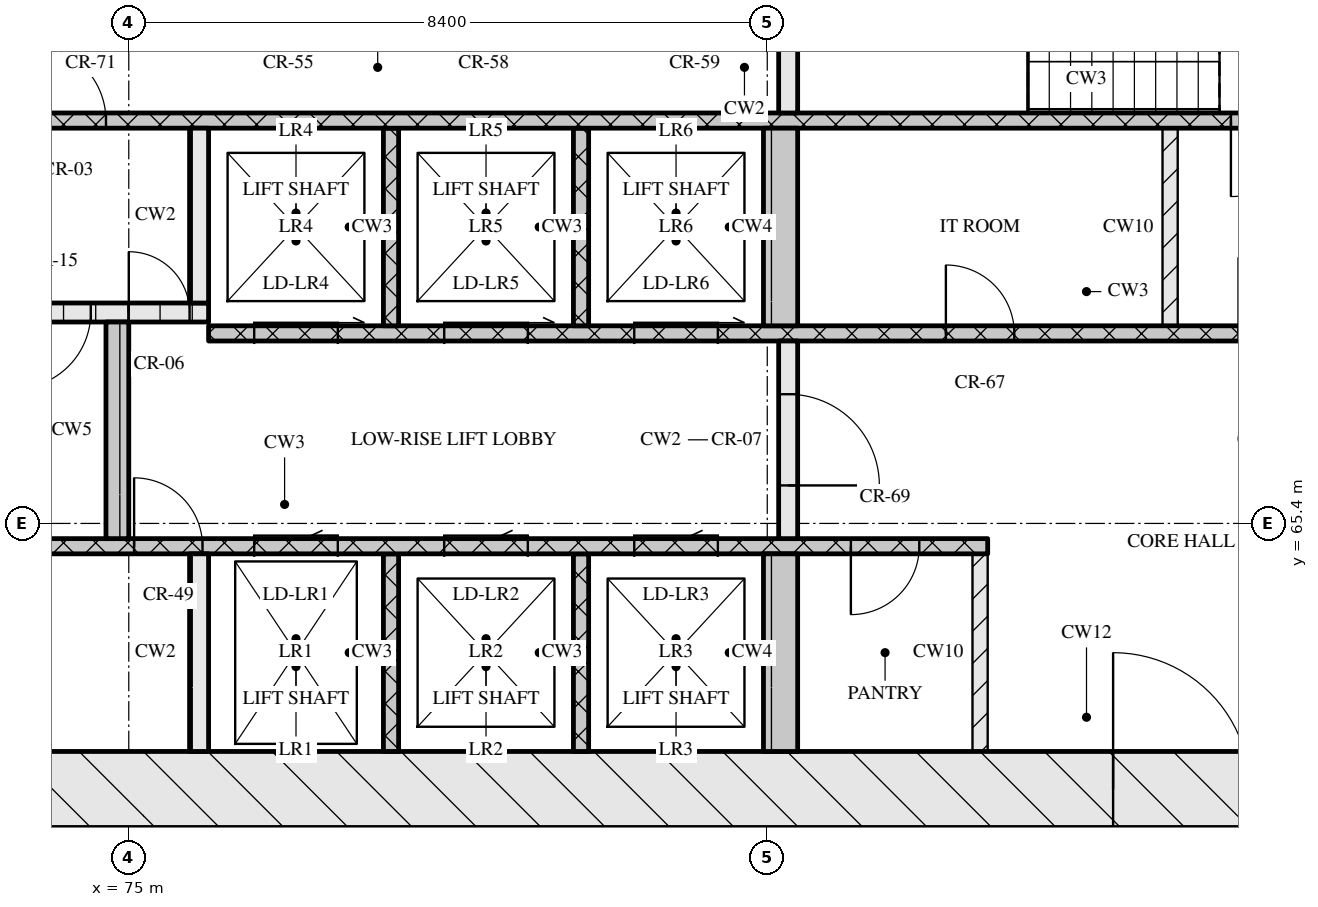
"""IFC4 building model, lengths in metres.
Left out: names, types, materials, properties, quantities, classifications, styles, units other than length and angle.
Written with IfcOpenShell. Run it as: python <this file> out.ifc"""

import sys

from ifc_helpers import new_model, si_unit, direction, frame, frame_2d, origin, place, context, subcontext, project, spatial, rectangle, extrude, element, fill, save


model = new_model("IFC4")
c1 = context("Model", 3, precision=1e-05, world=origin(), true_north=direction((0.0, 1.0)))
c2 = subcontext(c1, "Body", "Model", "MODEL_VIEW")
j1 = project(units=[si_unit("LENGTHUNIT", "METRE"), si_unit("PLANEANGLEUNIT", "RADIAN")], contexts=[c1])
p1 = place(None, origin())
s1 = spatial("IfcSite", under=j1, at=p1, CompositionType="ELEMENT")
p2 = place(p1, origin())
s2 = spatial("IfcBuilding", under=s1, at=p2, CompositionType="ELEMENT")
p3 = place(p2, frame((0.0, 0.0, 138.45)))
s3 = spatial("IfcBuildingStorey", under=s2, at=p3, CompositionType="ELEMENT", Elevation=138.45)
p4 = place(p3, frame((66.8, 61.9, 0.0), z_axis=(0.0, 0.0, 1.0), x_axis=(1.0, 0.0, 0.0)))
e1 = element("IfcWall", 1, at=p4, inside=s3, PredefinedType="SOLIDWALL", context=c2, shape_type="SweptSolid", body=[
    extrude(rectangle(XDim=41.6, YDim=1.0, at=frame_2d((20.8, 0.0))), origin(), (0.0, 0.0, 1.0), 3.3),
])
p5 = place(p4, frame((21.15, 0.0, 0.0)))
e2 = element("IfcOpeningElement", 2, at=p5, cuts=e1, PredefinedType="OPENING", context=c2, shape_type="SweptSolid", body=[
    extrude(rectangle(XDim=1.8, YDim=2.1, at=frame_2d((0.9, 1.05))), frame((0.0, 0.51, 0.0), z_axis=(0.0, -1.0, 0.0), x_axis=(1.0, 0.0, 0.0)), (0.0, 0.0, 1.0), 1.02),
])
p6 = place(p3, frame((75.925, 62.4, 0.0), z_axis=(0.0, 0.0, 1.0), x_axis=(0.0, 1.0, 0.0)))
e3 = element("IfcWall", 3, at=p6, inside=s3, PredefinedType="SOLIDWALL", context=c2, shape_type="SweptSolid", body=[
    extrude(rectangle(XDim=2.6, YDim=0.25, at=frame_2d((1.3, 0.0))), origin(), (0.0, 0.0, 1.0), 3.3),
])
for number, where, z_axis, x_axis in (
    (4, (78.45, 62.4, 0.0), (0.0, 0.0, 1.0), (0.0, 1.0, 0.0)),
    (5, (80.95, 62.4, 0.0), (0.0, 0.0, 1.0), (0.0, 1.0, 0.0)),
):
    element("IfcWall", number, at=place(p3, frame(where, z_axis=z_axis, x_axis=x_axis)), inside=s3, PredefinedType="SOLIDWALL", context=c2, shape_type="SweptSolid", body=[
        extrude(rectangle(XDim=2.6, YDim=0.2, at=frame_2d((1.3, 0.0))), origin(), (0.0, 0.0, 1.0), 3.3),
    ])
p7 = place(p3, frame((83.575, 62.4, 0.0), z_axis=(0.0, 0.0, 1.0), x_axis=(0.0, 1.0, 0.0)))
e6 = element("IfcWall", 6, at=p7, inside=s3, PredefinedType="SOLIDWALL", context=c2, shape_type="SweptSolid", body=[
    extrude(rectangle(XDim=2.6, YDim=0.45, at=frame_2d((1.3, 0.0))), origin(), (0.0, 0.0, 1.0), 3.3),
])
p8 = place(p3, frame((86.2, 62.4, 0.0), z_axis=(0.0, 0.0, 1.0), x_axis=(0.0, 1.0, 0.0)))
e7 = element("IfcWall", 7, at=p8, inside=s3, PredefinedType="PARTITIONING", context=c2, shape_type="SweptSolid", body=[
    extrude(rectangle(XDim=2.6, YDim=0.2, at=frame_2d((1.3, 0.0))), origin(), (0.0, 0.0, 1.0), 3.3),
])
p9 = place(p3, frame((67.8, 65.1, 0.0), z_axis=(0.0, 0.0, 1.0), x_axis=(1.0, 0.0, 0.0)))
e8 = element("IfcWall", 8, at=p9, inside=s3, PredefinedType="SOLIDWALL", context=c2, shape_type="SweptSolid", body=[
    extrude(rectangle(XDim=18.5, YDim=0.2, at=frame_2d((9.25, 0.0))), origin(), (0.0, 0.0, 1.0), 3.3),
])
p10 = place(p9, frame((7.27, 0.0, 0.0)))
e9 = element("IfcOpeningElement", 9, at=p10, cuts=e8, PredefinedType="OPENING", context=c2, shape_type="SweptSolid", body=[
    extrude(rectangle(XDim=0.9, YDim=2.1, at=frame_2d((0.45, 1.05))), frame((0.0, 0.11, 0.0), z_axis=(0.0, -1.0, 0.0), x_axis=(1.0, 0.0, 0.0)), (0.0, 0.0, 1.0), 0.22),
])
p11 = place(p9, frame((8.85, 0.0, 0.0)))
e10 = element("IfcOpeningElement", 10, at=p11, cuts=e8, PredefinedType="OPENING", context=c2, shape_type="SweptSolid", body=[
    extrude(rectangle(XDim=1.1, YDim=2.1, at=frame_2d((0.55, 1.05))), frame((0.0, 0.11, 0.0), z_axis=(0.0, -1.0, 0.0), x_axis=(1.0, 0.0, 0.0)), (0.0, 0.0, 1.0), 0.22),
])
p12 = place(p9, frame((11.35, 0.0, 0.0)))
e11 = element("IfcOpeningElement", 11, at=p12, cuts=e8, PredefinedType="OPENING", context=c2, shape_type="SweptSolid", body=[
    extrude(rectangle(XDim=1.1, YDim=2.1, at=frame_2d((0.55, 1.05))), frame((0.0, 0.11, 0.0), z_axis=(0.0, -1.0, 0.0), x_axis=(1.0, 0.0, 0.0)), (0.0, 0.0, 1.0), 0.22),
])
p13 = place(p9, frame((13.85, 0.0, 0.0)))
e12 = element("IfcOpeningElement", 12, at=p13, cuts=e8, PredefinedType="OPENING", context=c2, shape_type="SweptSolid", body=[
    extrude(rectangle(XDim=1.1, YDim=2.1, at=frame_2d((0.55, 1.05))), frame((0.0, 0.11, 0.0), z_axis=(0.0, -1.0, 0.0), x_axis=(1.0, 0.0, 0.0)), (0.0, 0.0, 1.0), 0.22),
])
p14 = place(p9, frame((16.7, 0.0, 0.0)))
e13 = element("IfcOpeningElement", 13, at=p14, cuts=e8, PredefinedType="OPENING", context=c2, shape_type="SweptSolid", body=[
    extrude(rectangle(XDim=0.9, YDim=2.1, at=frame_2d((0.45, 1.05))), frame((0.0, 0.11, 0.0), z_axis=(0.0, -1.0, 0.0), x_axis=(1.0, 0.0, 0.0)), (0.0, 0.0, 1.0), 0.22),
])
p15 = place(p3, frame((74.85, 65.2, 0.0), z_axis=(0.0, 0.0, 1.0), x_axis=(0.0, 1.0, 0.0)))
e14 = element("IfcWall", 14, at=p15, inside=s3, PredefinedType="SOLIDWALL", context=c2, shape_type="SweptSolid", body=[
    extrude(rectangle(XDim=2.85, YDim=0.3, at=frame_2d((1.425, 0.0))), origin(), (0.0, 0.0, 1.0), 3.3),
])
p16 = place(p3, frame((83.675, 65.2, 0.0), z_axis=(0.0, 0.0, 1.0), x_axis=(0.0, 1.0, 0.0)))
e15 = element("IfcWall", 15, at=p16, inside=s3, PredefinedType="SOLIDWALL", context=c2, shape_type="SweptSolid", body=[
    extrude(rectangle(XDim=2.6, YDim=0.25, at=frame_2d((1.3, 0.0))), origin(), (0.0, 0.0, 1.0), 3.3),
])
p17 = place(p16, frame((0.7, 0.0, 0.0)))
e16 = element("IfcOpeningElement", 16, at=p17, cuts=e15, PredefinedType="OPENING", context=c2, shape_type="SweptSolid", body=[
    extrude(rectangle(XDim=1.2, YDim=2.1, at=frame_2d((0.6, 1.05))), frame((0.0, 0.135, 0.0), z_axis=(0.0, -1.0, 0.0), x_axis=(1.0, 0.0, 0.0)), (0.0, 0.0, 1.0), 0.27),
])
p18 = place(p3, frame((76.05, 67.9, 0.0), z_axis=(0.0, 0.0, 1.0), x_axis=(1.0, 0.0, 0.0)))
e17 = element("IfcWall", 17, at=p18, inside=s3, PredefinedType="SOLIDWALL", context=c2, shape_type="SweptSolid", body=[
    extrude(rectangle(XDim=23.1, YDim=0.2, at=frame_2d((11.55, 0.0))), origin(), (0.0, 0.0, 1.0), 3.3),
])
p19 = place(p18, frame((0.6, 0.0, 0.0)))
e18 = element("IfcOpeningElement", 18, at=p19, cuts=e17, PredefinedType="OPENING", context=c2, shape_type="SweptSolid", body=[
    extrude(rectangle(XDim=1.1, YDim=2.1, at=frame_2d((0.55, 1.05))), frame((0.0, 0.11, 0.0), z_axis=(0.0, -1.0, 0.0), x_axis=(1.0, 0.0, 0.0)), (0.0, 0.0, 1.0), 0.22),
])
p20 = place(p18, frame((3.1, 0.0, 0.0)))
e19 = element("IfcOpeningElement", 19, at=p20, cuts=e17, PredefinedType="OPENING", context=c2, shape_type="SweptSolid", body=[
    extrude(rectangle(XDim=1.1, YDim=2.1, at=frame_2d((0.55, 1.05))), frame((0.0, 0.11, 0.0), z_axis=(0.0, -1.0, 0.0), x_axis=(1.0, 0.0, 0.0)), (0.0, 0.0, 1.0), 0.22),
])
p21 = place(p18, frame((5.6, 0.0, 0.0)))
e20 = element("IfcOpeningElement", 20, at=p21, cuts=e17, PredefinedType="OPENING", context=c2, shape_type="SweptSolid", body=[
    extrude(rectangle(XDim=1.1, YDim=2.1, at=frame_2d((0.55, 1.05))), frame((0.0, 0.11, 0.0), z_axis=(0.0, -1.0, 0.0), x_axis=(1.0, 0.0, 0.0)), (0.0, 0.0, 1.0), 0.22),
])
p22 = place(p18, frame((9.7, 0.0, 0.0)))
e21 = element("IfcOpeningElement", 21, at=p22, cuts=e17, PredefinedType="OPENING", context=c2, shape_type="SweptSolid", body=[
    extrude(rectangle(XDim=0.9, YDim=2.1, at=frame_2d((0.45, 1.05))), frame((0.0, 0.11, 0.0), z_axis=(0.0, -1.0, 0.0), x_axis=(1.0, 0.0, 0.0)), (0.0, 0.0, 1.0), 0.22),
])
p23 = place(p18, frame((13.55, 0.0, 0.0)))
e22 = element("IfcOpeningElement", 22, at=p23, cuts=e17, PredefinedType="OPENING", context=c2, shape_type="SweptSolid", body=[
    extrude(rectangle(XDim=1.0, YDim=2.1, at=frame_2d((0.5, 1.05))), frame((0.0, 0.11, 0.0), z_axis=(0.0, -1.0, 0.0), x_axis=(1.0, 0.0, 0.0)), (0.0, 0.0, 1.0), 0.22),
])
for number, where, z_axis, x_axis in (
    (23, (78.45, 68.0, 0.0), (0.0, 0.0, 1.0), (0.0, 1.0, 0.0)),
    (24, (80.95, 68.0, 0.0), (0.0, 0.0, 1.0), (0.0, 1.0, 0.0)),
):
    element("IfcWall", number, at=place(p3, frame(where, z_axis=z_axis, x_axis=x_axis)), inside=s3, PredefinedType="SOLIDWALL", context=c2, shape_type="SweptSolid", body=[
        extrude(rectangle(XDim=2.6, YDim=0.2, at=frame_2d((1.3, 0.0))), origin(), (0.0, 0.0, 1.0), 3.3),
    ])
p24 = place(p3, frame((83.575, 68.0, 0.0), z_axis=(0.0, 0.0, 1.0), x_axis=(0.0, 1.0, 0.0)))
e25 = element("IfcWall", 25, at=p24, inside=s3, PredefinedType="SOLIDWALL", context=c2, shape_type="SweptSolid", body=[
    extrude(rectangle(XDim=2.6, YDim=0.45, at=frame_2d((1.3, 0.0))), origin(), (0.0, 0.0, 1.0), 3.3),
])
p25 = place(p3, frame((88.7, 68.0, 0.0), z_axis=(0.0, 0.0, 1.0), x_axis=(0.0, 1.0, 0.0)))
e26 = element("IfcWall", 26, at=p25, inside=s3, PredefinedType="PARTITIONING", context=c2, shape_type="SweptSolid", body=[
    extrude(rectangle(XDim=2.6, YDim=0.2, at=frame_2d((1.3, 0.0))), origin(), (0.0, 0.0, 1.0), 3.3),
])
p26 = place(p3, frame((67.8, 68.175, 0.0), z_axis=(0.0, 0.0, 1.0), x_axis=(1.0, 0.0, 0.0)))
e27 = element("IfcWall", 27, at=p26, inside=s3, PredefinedType="SOLIDWALL", context=c2, shape_type="SweptSolid", body=[
    extrude(rectangle(XDim=8.25, YDim=0.25, at=frame_2d((4.125, 0.0))), origin(), (0.0, 0.0, 1.0), 3.3),
])
p27 = place(p26, frame((5.7, 0.0, 0.0)))
e28 = element("IfcOpeningElement", 28, at=p27, cuts=e27, PredefinedType="OPENING", context=c2, shape_type="SweptSolid", body=[
    extrude(rectangle(XDim=1.0, YDim=2.1, at=frame_2d((0.5, 1.05))), frame((0.0, 0.135, 0.0), z_axis=(0.0, -1.0, 0.0), x_axis=(1.0, 0.0, 0.0)), (0.0, 0.0, 1.0), 0.27),
])
p28 = place(p26, frame((7.2, 0.0, 0.0)))
e29 = element("IfcOpeningElement", 29, at=p28, cuts=e27, PredefinedType="OPENING", context=c2, shape_type="SweptSolid", body=[
    extrude(rectangle(XDim=0.8, YDim=2.1, at=frame_2d((0.4, 1.05))), frame((0.0, 0.135, 0.0), z_axis=(0.0, -1.0, 0.0), x_axis=(1.0, 0.0, 0.0)), (0.0, 0.0, 1.0), 0.27),
])
p29 = place(p3, frame((75.925, 68.3, 0.0), z_axis=(0.0, 0.0, 1.0), x_axis=(0.0, 1.0, 0.0)))
e30 = element("IfcWall", 30, at=p29, inside=s3, PredefinedType="SOLIDWALL", context=c2, shape_type="SweptSolid", body=[
    extrude(rectangle(XDim=2.3, YDim=0.25, at=frame_2d((1.15, 0.0))), origin(), (0.0, 0.0, 1.0), 3.3),
])
p30 = place(p3, frame((67.8, 70.7, 0.0), z_axis=(0.0, 0.0, 1.0), x_axis=(1.0, 0.0, 0.0)))
e31 = element("IfcWall", 31, at=p30, inside=s3, PredefinedType="SOLIDWALL", context=c2, shape_type="SweptSolid", body=[
    extrude(rectangle(XDim=39.6, YDim=0.2, at=frame_2d((19.8, 0.0))), origin(), (0.0, 0.0, 1.0), 3.3),
])
p31 = place(p30, frame((0.65, 0.0, 0.0)))
e32 = element("IfcOpeningElement", 32, at=p31, cuts=e31, PredefinedType="OPENING", context=c2, shape_type="SweptSolid", body=[
    extrude(rectangle(XDim=1.1, YDim=2.1, at=frame_2d((0.55, 1.05))), frame((0.0, 0.11, 0.0), z_axis=(0.0, -1.0, 0.0), x_axis=(1.0, 0.0, 0.0)), (0.0, 0.0, 1.0), 0.22),
])
p32 = place(p30, frame((3.25, 0.0, 0.0)))
e33 = element("IfcOpeningElement", 33, at=p32, cuts=e31, PredefinedType="OPENING", context=c2, shape_type="SweptSolid", body=[
    extrude(rectangle(XDim=1.1, YDim=2.1, at=frame_2d((0.55, 1.05))), frame((0.0, 0.11, 0.0), z_axis=(0.0, -1.0, 0.0), x_axis=(1.0, 0.0, 0.0)), (0.0, 0.0, 1.0), 0.22),
])
p33 = place(p30, frame((5.9, 0.0, 0.0)))
e34 = element("IfcOpeningElement", 34, at=p33, cuts=e31, PredefinedType="OPENING", context=c2, shape_type="SweptSolid", body=[
    extrude(rectangle(XDim=1.0, YDim=2.1, at=frame_2d((0.5, 1.05))), frame((0.0, 0.11, 0.0), z_axis=(0.0, -1.0, 0.0), x_axis=(1.0, 0.0, 0.0)), (0.0, 0.0, 1.0), 0.22),
])
p34 = place(p30, frame((21.7, 0.0, 0.0)))
e35 = element("IfcOpeningElement", 35, at=p34, cuts=e31, PredefinedType="OPENING", context=c2, shape_type="SweptSolid", body=[
    extrude(rectangle(XDim=1.0, YDim=2.1, at=frame_2d((0.5, 1.05))), frame((0.0, 0.11, 0.0), z_axis=(0.0, -1.0, 0.0), x_axis=(1.0, 0.0, 0.0)), (0.0, 0.0, 1.0), 0.22),
])
p35 = place(p30, frame((32.7, 0.0, 0.0)))
e36 = element("IfcOpeningElement", 36, at=p35, cuts=e31, PredefinedType="OPENING", context=c2, shape_type="SweptSolid", body=[
    extrude(rectangle(XDim=1.0, YDim=2.1, at=frame_2d((0.5, 1.05))), frame((0.0, 0.11, 0.0), z_axis=(0.0, -1.0, 0.0), x_axis=(1.0, 0.0, 0.0)), (0.0, 0.0, 1.0), 0.22),
])
p36 = place(p30, frame((35.25, 0.0, 0.0)))
e37 = element("IfcOpeningElement", 37, at=p36, cuts=e31, PredefinedType="OPENING", context=c2, shape_type="SweptSolid", body=[
    extrude(rectangle(XDim=1.1, YDim=2.1, at=frame_2d((0.55, 1.05))), frame((0.0, 0.11, 0.0), z_axis=(0.0, -1.0, 0.0), x_axis=(1.0, 0.0, 0.0)), (0.0, 0.0, 1.0), 0.22),
])
p37 = place(p30, frame((37.85, 0.0, 0.0)))
e38 = element("IfcOpeningElement", 38, at=p37, cuts=e31, PredefinedType="OPENING", context=c2, shape_type="SweptSolid", body=[
    extrude(rectangle(XDim=1.1, YDim=2.1, at=frame_2d((0.55, 1.05))), frame((0.0, 0.11, 0.0), z_axis=(0.0, -1.0, 0.0), x_axis=(1.0, 0.0, 0.0)), (0.0, 0.0, 1.0), 0.22),
])
p38 = place(p3, frame((83.675, 70.8, 0.0), z_axis=(0.0, 0.0, 1.0), x_axis=(0.0, 1.0, 0.0)))
e39 = element("IfcWall", 39, at=p38, inside=s3, PredefinedType="SOLIDWALL", context=c2, shape_type="SweptSolid", body=[
    extrude(rectangle(XDim=1.2, YDim=0.25, at=frame_2d((0.6, 0.0))), origin(), (0.0, 0.0, 1.0), 3.3),
])
p39 = place(p5, origin())
e40 = element("IfcDoor", 40, at=p39, inside=s3, OperationType="DOUBLE_DOOR_SINGLE_SWING", PredefinedType="DOOR", context=c2, shape_type="SweptSolid", body=[
    extrude(rectangle(XDim=1.8, YDim=2.1, at=frame_2d((0.9, 1.05))), frame((0.0, 0.025, 0.0), z_axis=(0.0, -1.0, 0.0), x_axis=(1.0, 0.0, 0.0)), (0.0, 0.0, 1.0), 0.05),
])
fill(e2, e40)
p40 = place(p10, origin())
e41 = element("IfcDoor", 41, at=p40, inside=s3, OperationType="SINGLE_SWING_LEFT", PredefinedType="DOOR", context=c2, shape_type="SweptSolid", body=[
    extrude(rectangle(XDim=0.9, YDim=2.1, at=frame_2d((0.45, 1.05))), frame((0.0, 0.025, 0.0), z_axis=(0.0, -1.0, 0.0), x_axis=(1.0, 0.0, 0.0)), (0.0, 0.0, 1.0), 0.05),
])
fill(e9, e41)
p41 = place(p11, origin())
e42 = element("IfcDoor", 42, at=p41, inside=s3, OperationType="SLIDING_TO_LEFT", PredefinedType="DOOR", context=c2, shape_type="SweptSolid", body=[
    extrude(rectangle(XDim=1.1, YDim=2.1, at=frame_2d((0.55, 1.05))), frame((0.0, 0.025, 0.0), z_axis=(0.0, -1.0, 0.0), x_axis=(1.0, 0.0, 0.0)), (0.0, 0.0, 1.0), 0.05),
])
fill(e10, e42)
p42 = place(p12, origin())
e43 = element("IfcDoor", 43, at=p42, inside=s3, OperationType="SLIDING_TO_LEFT", PredefinedType="DOOR", context=c2, shape_type="SweptSolid", body=[
    extrude(rectangle(XDim=1.1, YDim=2.1, at=frame_2d((0.55, 1.05))), frame((0.0, 0.025, 0.0), z_axis=(0.0, -1.0, 0.0), x_axis=(1.0, 0.0, 0.0)), (0.0, 0.0, 1.0), 0.05),
])
fill(e11, e43)
p43 = place(p13, origin())
e44 = element("IfcDoor", 44, at=p43, inside=s3, OperationType="SLIDING_TO_LEFT", PredefinedType="DOOR", context=c2, shape_type="SweptSolid", body=[
    extrude(rectangle(XDim=1.1, YDim=2.1, at=frame_2d((0.55, 1.05))), frame((0.0, 0.025, 0.0), z_axis=(0.0, -1.0, 0.0), x_axis=(1.0, 0.0, 0.0)), (0.0, 0.0, 1.0), 0.05),
])
fill(e12, e44)
p44 = place(p14, origin())
e45 = element("IfcDoor", 45, at=p44, inside=s3, OperationType="SINGLE_SWING_RIGHT", PredefinedType="DOOR", context=c2, shape_type="SweptSolid", body=[
    extrude(rectangle(XDim=0.9, YDim=2.1, at=frame_2d((0.45, 1.05))), frame((0.0, 0.025, 0.0), z_axis=(0.0, -1.0, 0.0), x_axis=(1.0, 0.0, 0.0)), (0.0, 0.0, 1.0), 0.05),
])
fill(e13, e45)
p45 = place(p17, origin())
e46 = element("IfcDoor", 46, at=p45, inside=s3, OperationType="SINGLE_SWING_RIGHT", PredefinedType="DOOR", context=c2, shape_type="SweptSolid", body=[
    extrude(rectangle(XDim=1.2, YDim=2.1, at=frame_2d((0.6, 1.05))), frame((0.0, 0.025, 0.0), z_axis=(0.0, -1.0, 0.0), x_axis=(1.0, 0.0, 0.0)), (0.0, 0.0, 1.0), 0.05),
])
fill(e16, e46)
p46 = place(p19, origin())
e47 = element("IfcDoor", 47, at=p46, inside=s3, OperationType="SLIDING_TO_RIGHT", PredefinedType="DOOR", context=c2, shape_type="SweptSolid", body=[
    extrude(rectangle(XDim=1.1, YDim=2.1, at=frame_2d((0.55, 1.05))), frame((0.0, 0.025, 0.0), z_axis=(0.0, -1.0, 0.0), x_axis=(1.0, 0.0, 0.0)), (0.0, 0.0, 1.0), 0.05),
])
fill(e18, e47)
p47 = place(p20, origin())
e48 = element("IfcDoor", 48, at=p47, inside=s3, OperationType="SLIDING_TO_RIGHT", PredefinedType="DOOR", context=c2, shape_type="SweptSolid", body=[
    extrude(rectangle(XDim=1.1, YDim=2.1, at=frame_2d((0.55, 1.05))), frame((0.0, 0.025, 0.0), z_axis=(0.0, -1.0, 0.0), x_axis=(1.0, 0.0, 0.0)), (0.0, 0.0, 1.0), 0.05),
])
fill(e19, e48)
p48 = place(p21, origin())
e49 = element("IfcDoor", 49, at=p48, inside=s3, OperationType="SLIDING_TO_RIGHT", PredefinedType="DOOR", context=c2, shape_type="SweptSolid", body=[
    extrude(rectangle(XDim=1.1, YDim=2.1, at=frame_2d((0.55, 1.05))), frame((0.0, 0.025, 0.0), z_axis=(0.0, -1.0, 0.0), x_axis=(1.0, 0.0, 0.0)), (0.0, 0.0, 1.0), 0.05),
])
fill(e20, e49)
p49 = place(p22, origin())
e50 = element("IfcDoor", 50, at=p49, inside=s3, OperationType="SINGLE_SWING_LEFT", PredefinedType="DOOR", context=c2, shape_type="SweptSolid", body=[
    extrude(rectangle(XDim=0.9, YDim=2.1, at=frame_2d((0.45, 1.05))), frame((0.0, 0.025, 0.0), z_axis=(0.0, -1.0, 0.0), x_axis=(1.0, 0.0, 0.0)), (0.0, 0.0, 1.0), 0.05),
])
fill(e21, e50)
p50 = place(p27, origin())
e51 = element("IfcDoor", 51, at=p50, inside=s3, OperationType="SINGLE_SWING_RIGHT", PredefinedType="DOOR", context=c2, shape_type="SweptSolid", body=[
    extrude(rectangle(XDim=1.0, YDim=2.1, at=frame_2d((0.5, 1.05))), frame((0.0, 0.025, 0.0), z_axis=(0.0, -1.0, 0.0), x_axis=(1.0, 0.0, 0.0)), (0.0, 0.0, 1.0), 0.05),
])
fill(e28, e51)
p51 = place(p28, origin())
e52 = element("IfcDoor", 52, at=p51, inside=s3, OperationType="SINGLE_SWING_LEFT", PredefinedType="DOOR", context=c2, shape_type="SweptSolid", body=[
    extrude(rectangle(XDim=0.8, YDim=2.1, at=frame_2d((0.4, 1.05))), frame((0.0, 0.025, 0.0), z_axis=(0.0, -1.0, 0.0), x_axis=(1.0, 0.0, 0.0)), (0.0, 0.0, 1.0), 0.05),
])
fill(e29, e52)
p52 = place(p33, origin())
e53 = element("IfcDoor", 53, at=p52, inside=s3, OperationType="SINGLE_SWING_LEFT", PredefinedType="DOOR", context=c2, shape_type="SweptSolid", body=[
    extrude(rectangle(XDim=1.0, YDim=2.1, at=frame_2d((0.5, 1.05))), frame((0.0, 0.025, 0.0), z_axis=(0.0, -1.0, 0.0), x_axis=(1.0, 0.0, 0.0)), (0.0, 0.0, 1.0), 0.05),
])
fill(e34, e53)
p53 = place(p34, origin())
e54 = element("IfcDoor", 54, at=p53, inside=s3, OperationType="SINGLE_SWING_RIGHT", PredefinedType="DOOR", context=c2, shape_type="SweptSolid", body=[
    extrude(rectangle(XDim=1.0, YDim=2.1, at=frame_2d((0.5, 1.05))), frame((0.0, 0.025, 0.0), z_axis=(0.0, -1.0, 0.0), x_axis=(1.0, 0.0, 0.0)), (0.0, 0.0, 1.0), 0.05),
])
fill(e35, e54)
save(model, sys.argv[1])
